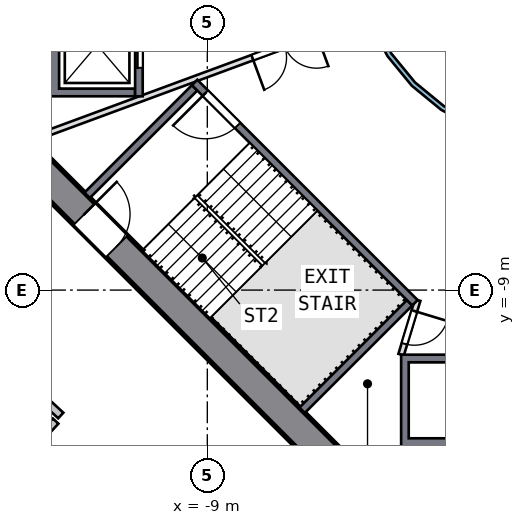
"""IFC4 building model, lengths in metres.
Left out: names, types, materials, properties, quantities, classifications, styles, units other than length and angle.
Written with IfcOpenShell. Run it as: python <this file> out.ifc"""

import sys

from ifc_helpers import new_model, si_unit, direction, frame, frame_2d, origin, place, context, subcontext, project, spatial, polyline, rectangle, outline, extrude, element, fill, save


model = new_model("IFC4")
c1 = context("Model", 3, precision=1e-05, world=origin(), true_north=direction((0.0, 1.0)))
c2 = subcontext(c1, "Body", "Model", "MODEL_VIEW")
j1 = project(units=[si_unit("LENGTHUNIT", "METRE"), si_unit("PLANEANGLEUNIT", "RADIAN")], contexts=[c1])
p1 = place(None, origin())
s1 = spatial("IfcSite", under=j1, at=p1, CompositionType="ELEMENT")
p2 = place(p1, origin())
s2 = spatial("IfcBuilding", under=s1, at=p2, CompositionType="ELEMENT")
p3 = place(p2, frame((0.0, 0.0, 103.5)))
s3 = spatial("IfcBuildingStorey", under=s2, at=p3, CompositionType="ELEMENT", Elevation=103.5)
p4 = place(p3, frame((-13.717, -5.516, 0.0), z_axis=(0.0, 0.0, 1.0), x_axis=(0.707106781, -0.707106781, 0.0)))
e1 = element("IfcWall", 1, at=p4, inside=s3, PredefinedType="SHEAR", context=c2, shape_type="SweptSolid", body=[
    extrude(rectangle(XDim=11.598, YDim=0.8, at=frame_2d((5.799, 0.0))), origin(), (0.0, 0.0, 1.0), 3.5),
])
p5 = place(p4, frame((2.099, 0.0, 0.0)))
e2 = element("IfcOpeningElement", 2, at=p5, cuts=e1, PredefinedType="OPENING", context=c2, shape_type="SweptSolid", body=[
    extrude(rectangle(XDim=1.2, YDim=2.1, at=frame_2d((0.6, 1.05))), frame((0.0, 0.41, 0.0), z_axis=(0.0, -1.0, 0.0), x_axis=(1.0, 0.0, 0.0)), (0.0, 0.0, 1.0), 0.82),
])
p6 = place(p3, origin())
e3 = element("IfcWall", 3, at=p6, inside=s3, PredefinedType="SOLIDWALL", context=c2, shape_type="SweptSolid", body=[
    extrude(outline(polyline([(-13.2, -3.9), (-13.2, -1.2), (-10.9, -1.2), (-10.9, -1.4), (-12.9, -1.4), (-12.9, -3.7), (-10.9, -3.7), (-10.9, -3.9), (-13.2, -3.9)])), origin(), (0.0, 0.0, 1.0), 3.19),
])
p7 = place(p3, frame((-10.8, -1.2, 0.0), z_axis=(0.0, 0.0, 1.0), x_axis=(0.0, -1.0, 0.0)))
e4 = element("IfcWall", 4, at=p7, inside=s3, PredefinedType="SOLIDWALL", context=c2, shape_type="SweptSolid", body=[
    extrude(rectangle(XDim=2.7, YDim=0.2, at=frame_2d((1.35, 0.0))), origin(), (0.0, 0.0, 1.0), 3.19),
])
p8 = place(p7, frame((0.75, 0.0, 0.0)))
e5 = element("IfcOpeningElement", 5, at=p8, cuts=e4, PredefinedType="OPENING", context=c2, shape_type="SweptSolid", body=[
    extrude(rectangle(XDim=1.2, YDim=2.1, at=frame_2d((0.6, 1.05))), frame((0.0, 0.11, 0.0), z_axis=(0.0, -1.0, 0.0), x_axis=(1.0, 0.0, 0.0)), (0.0, 0.0, 1.0), 0.22),
])
p9 = place(p3, origin())
e6 = element("IfcWall", 6, at=p9, inside=s3, PredefinedType="SOLIDWALL", context=c2, shape_type="SweptSolid", body=[
    extrude(outline(polyline([(-1.2, -13.2), (-3.9, -13.2), (-3.9, -10.7), (-1.2, -10.7), (-1.2, -13.2)]), holes=[polyline([(-3.7, -10.9), (-3.7, -12.9), (-1.4, -12.9), (-1.4, -10.9), (-3.7, -10.9)])]), origin(), (0.0, 0.0, 1.0), 3.19),
])
p10 = place(p3, frame((-3.535, -9.334, 0.0), z_axis=(0.0, 0.0, 1.0), x_axis=(-0.707106781, 0.707106781, 0.0)))
e7 = element("IfcWall", 7, at=p10, inside=s3, PredefinedType="SOLIDWALL", context=c2, shape_type="SweptSolid", body=[
    extrude(rectangle(XDim=8.2, YDim=0.2, at=frame_2d((4.1, 0.0))), origin(), (0.0, 0.0, 1.0), 3.19),
])
p11 = place(p10, frame((6.6, 0.0, 0.0)))
e8 = element("IfcOpeningElement", 8, at=p11, cuts=e7, PredefinedType="OPENING", context=c2, shape_type="SweptSolid", body=[
    extrude(rectangle(XDim=1.2, YDim=2.1, at=frame_2d((0.6, 1.05))), frame((0.0, 0.11, 0.0), z_axis=(0.0, -1.0, 0.0), x_axis=(1.0, 0.0, 0.0)), (0.0, 0.0, 1.0), 0.22),
])
for number, where, z_axis, x_axis in (
    (9, (-9.334, -3.677, 0.0), (0.0, 0.0, 1.0), (-0.707, -0.707, 0.0)),
    (10, (-3.677, -9.334, 0.0), (0.0, 0.0, 1.0), (-0.707, -0.707, 0.0)),
):
    element("IfcWall", number, at=place(p3, frame(where, z_axis=z_axis, x_axis=x_axis)), inside=s3, PredefinedType="SOLIDWALL", context=c2, shape_type="SweptSolid", body=[
        extrude(rectangle(XDim=4.0, YDim=0.2, at=frame_2d((2.0, 0.0))), origin(), (0.0, 0.0, 1.0), 3.19),
    ])
p12 = place(p3, frame((-3.465, -9.263, 0.0), z_axis=(0.0, 0.0, 1.0), x_axis=(-0.289808785, -0.957084567, 0.0)))
e11 = element("IfcWall", 11, at=p12, inside=s3, PredefinedType="PARTITIONING", context=c2, shape_type="SweptSolid", body=[
    extrude(rectangle(XDim=1.501, YDim=0.15, at=frame_2d((0.75, 0.0))), origin(), (0.0, 0.0, 1.0), 3.19),
])
p13 = place(p12, frame((0.301, 0.0, 0.0)))
e12 = element("IfcOpeningElement", 12, at=p13, cuts=e11, PredefinedType="OPENING", context=c2, shape_type="SweptSolid", body=[
    extrude(rectangle(XDim=0.9, YDim=2.1, at=frame_2d((0.45, 1.05))), frame((0.0, 0.085, 0.0), z_axis=(0.0, -1.0, 0.0), x_axis=(1.0, 0.0, 0.0)), (0.0, 0.0, 1.0), 0.17),
])
p14 = place(p3, frame((-4.813, -1.776, 0.0), z_axis=(0.0, 0.0, 1.0), x_axis=(-0.938191915, -0.346115488, 0.0)))
e13 = element("IfcWall", 13, at=p14, inside=s3, PredefinedType="PARTITIONING", context=c2, shape_type="SweptSolid", body=[
    extrude(rectangle(XDim=8.91, YDim=0.15, at=frame_2d((4.455, 0.0))), origin(), (0.0, 0.0, 1.0), 3.19),
])
p15 = place(p14, frame((1.4, 0.0, 0.0)))
e14 = element("IfcOpeningElement", 14, at=p15, cuts=e13, PredefinedType="OPENING", context=c2, shape_type="SweptSolid", body=[
    extrude(rectangle(XDim=1.8, YDim=2.1, at=frame_2d((0.9, 1.05))), frame((0.0, 0.085, 0.0), z_axis=(0.0, -1.0, 0.0), x_axis=(1.0, 0.0, 0.0)), (0.0, 0.0, 1.0), 0.17),
])
p16 = place(p3, origin())
e15 = element("IfcWall", 15, at=p16, inside=s3, PredefinedType="SOLIDWALL", context=c2, shape_type="SweptSolid", body=[
    extrude(outline(polyline([(5.021, -0.999), (4.73, -1.959), (4.257, -2.844), (3.62, -3.62), (2.844, -4.257), (1.959, -4.73), (0.999, -5.021), (0.0, -5.12), (-0.999, -5.021), (-1.959, -4.73), (-2.844, -4.257), (-3.62, -3.62), (-4.257, -2.844), (-4.73, -1.959), (-5.021, -0.999), (-5.12, 0.0), (-5.021, 0.999), (-4.73, 1.959), (-4.257, 2.844), (-3.62, 3.62), (-2.844, 4.257), (-1.959, 4.73), (-0.999, 5.021), (0.0, 5.12), (0.999, 5.021), (1.959, 4.73), (2.844, 4.257), (3.62, 3.62), (4.257, 2.844), (4.73, 1.959), (5.021, 0.999), (5.12, 0.0), (5.021, -0.999)]), holes=[polyline([(4.904, 0.976), (4.619, 1.913), (4.157, 2.778), (3.535, 3.535), (2.778, 4.157), (1.913, 4.619), (0.976, 4.904), (0.0, 5.0), (-0.976, 4.904), (-1.913, 4.619), (-2.778, 4.157), (-3.535, 3.535), (-4.157, 2.778), (-4.619, 1.913), (-4.904, 0.976), (-5.0, 0.0), (-4.904, -0.976), (-4.619, -1.913), (-4.157, -2.778), (-3.535, -3.535), (-2.778, -4.157), (-1.913, -4.619), (-0.976, -4.904), (0.0, -5.0), (0.976, -4.904), (1.913, -4.619), (2.778, -4.157), (3.535, -3.535), (4.157, -2.778), (4.619, -1.913), (4.904, -0.976), (5.0, 0.0), (4.904, 0.976)])]), origin(), (0.0, 0.0, 1.0), 3.19),
])
p17 = place(p3, frame((-24.485, -24.894, 0.0), z_axis=(0.0, 0.0, 1.0), x_axis=(0.678409972, 0.734683544, 0.0)))
e16 = element("IfcWall", 16, at=p17, inside=s3, PredefinedType="SOLIDWALL", context=c2, shape_type="SweptSolid", body=[
    extrude(rectangle(XDim=16.942, YDim=0.2, at=frame_2d((8.471, 0.0))), origin(), (0.0, 0.0, 1.0), 3.19),
])
p18 = place(p17, frame((2.15, 0.0, 0.0)))
e17 = element("IfcOpeningElement", 17, at=p18, cuts=e16, PredefinedType="OPENING", context=c2, shape_type="SweptSolid", body=[
    extrude(rectangle(XDim=1.0, YDim=2.1, at=frame_2d((0.5, 1.05))), frame((0.0, 0.11, 0.0), z_axis=(0.0, -1.0, 0.0), x_axis=(1.0, 0.0, 0.0)), (0.0, 0.0, 1.0), 0.22),
])
p19 = place(p3, frame((-15.354, -9.994, 0.0), z_axis=(0.0, 0.0, 1.0), x_axis=(0.734696063, -0.678396414, 0.0)))
e18 = element("IfcWall", 18, at=p19, inside=s3, PredefinedType="SOLIDWALL", context=c2, shape_type="SweptSolid", body=[
    extrude(rectangle(XDim=3.4, YDim=0.2, at=frame_2d((1.7, 0.0))), origin(), (0.0, 0.0, 1.0), 3.19),
])
p20 = place(p8, origin())
e19 = element("IfcDoor", 19, at=p20, inside=s3, OperationType="DOUBLE_DOOR_SLIDING", PredefinedType="DOOR", context=c2, shape_type="SweptSolid", body=[
    extrude(rectangle(XDim=1.2, YDim=2.1, at=frame_2d((0.6, 1.05))), frame((0.0, 0.025, 0.0), z_axis=(0.0, -1.0, 0.0), x_axis=(1.0, 0.0, 0.0)), (0.0, 0.0, 1.0), 0.05),
])
fill(e5, e19)
p21 = place(p11, origin())
e20 = element("IfcDoor", 20, at=p21, inside=s3, OperationType="SINGLE_SWING_RIGHT", PredefinedType="DOOR", context=c2, shape_type="SweptSolid", body=[
    extrude(rectangle(XDim=1.2, YDim=2.1, at=frame_2d((0.6, 1.05))), frame((0.0, 0.025, 0.0), z_axis=(0.0, -1.0, 0.0), x_axis=(1.0, 0.0, 0.0)), (0.0, 0.0, 1.0), 0.05),
])
fill(e8, e20)
p22 = place(p5, origin())
e21 = element("IfcDoor", 21, at=p22, inside=s3, OperationType="SINGLE_SWING_LEFT", PredefinedType="DOOR", context=c2, shape_type="SweptSolid", body=[
    extrude(rectangle(XDim=1.2, YDim=2.1, at=frame_2d((0.6, 1.05))), frame((0.0, 0.025, 0.0), z_axis=(0.0, -1.0, 0.0), x_axis=(1.0, 0.0, 0.0)), (0.0, 0.0, 1.0), 0.05),
])
fill(e2, e21)
p23 = place(p13, origin())
e22 = element("IfcDoor", 22, at=p23, inside=s3, OperationType="SINGLE_SWING_LEFT", PredefinedType="DOOR", context=c2, shape_type="SweptSolid", body=[
    extrude(rectangle(XDim=0.9, YDim=2.1, at=frame_2d((0.45, 1.05))), frame((0.0, 0.025, 0.0), z_axis=(0.0, -1.0, 0.0), x_axis=(1.0, 0.0, 0.0)), (0.0, 0.0, 1.0), 0.05),
])
fill(e12, e22)
p24 = place(p15, origin())
e23 = element("IfcDoor", 23, at=p24, inside=s3, OperationType="DOUBLE_DOOR_SINGLE_SWING", PredefinedType="DOOR", context=c2, shape_type="SweptSolid", body=[
    extrude(rectangle(XDim=1.8, YDim=2.1, at=frame_2d((0.9, 1.05))), frame((0.0, 0.025, 0.0), z_axis=(0.0, -1.0, 0.0), x_axis=(1.0, 0.0, 0.0)), (0.0, 0.0, 1.0), 0.05),
])
fill(e14, e23)
save(model, sys.argv[1])
